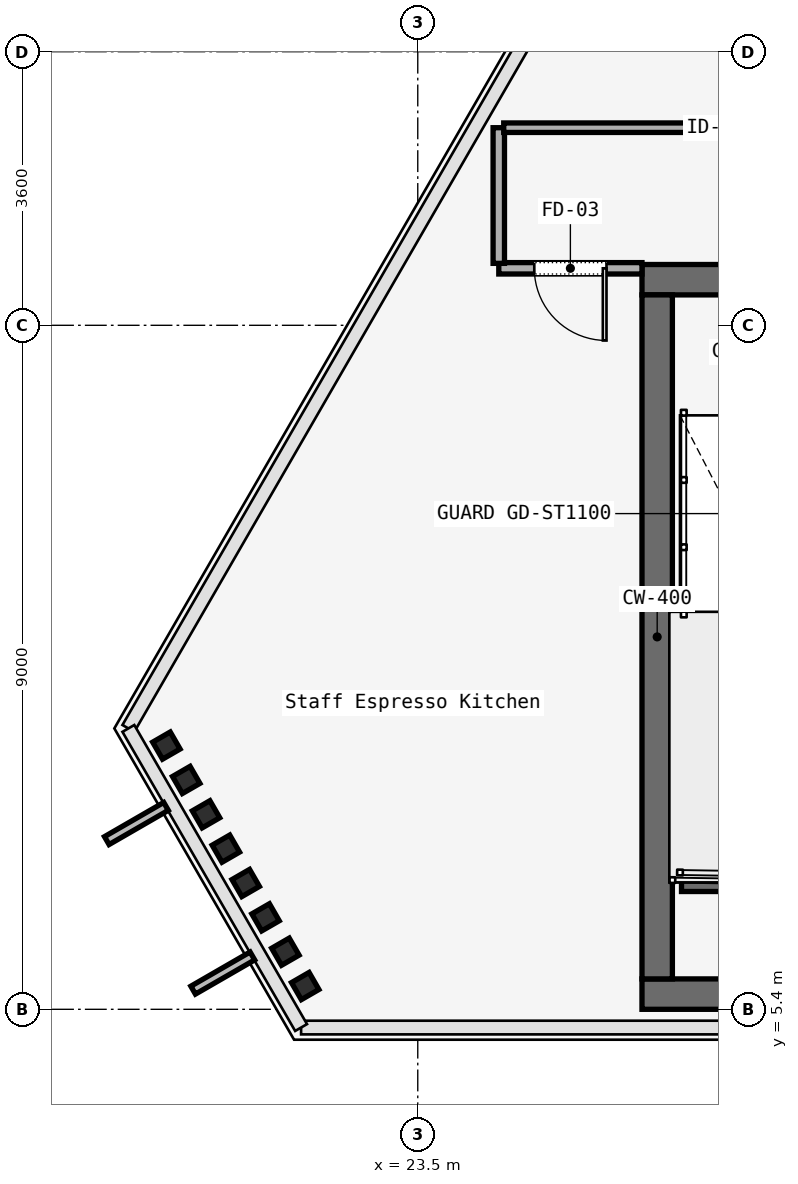
"""IFC4 building model, lengths in metres.
Left out: names, types, materials, properties, quantities, classifications, styles, units other than length and angle.
Written with IfcOpenShell. Run it as: python <this file> out.ifc"""

import sys

from ifc_helpers import new_model, si_unit, direction, frame, frame_2d, origin, origin_2d, place, context, subcontext, project, spatial, rectangle, i_section, extrude, element, fill, save


model = new_model("IFC4")
c1 = context("Model", 3, precision=1e-05, world=origin(), true_north=direction((0.0, 1.0)))
c2 = subcontext(c1, "Body", "Model", "MODEL_VIEW")
j1 = project(units=[si_unit("LENGTHUNIT", "METRE"), si_unit("PLANEANGLEUNIT", "RADIAN")], contexts=[c1])
p1 = place(None, origin())
s1 = spatial("IfcSite", under=j1, at=p1, CompositionType="ELEMENT")
p2 = place(p1, origin())
s2 = spatial("IfcBuilding", under=s1, at=p2, CompositionType="ELEMENT")
p3 = place(p2, frame((0.0, 0.0, 283.3)))
s3 = spatial("IfcBuildingStorey", under=s2, at=p3, CompositionType="ELEMENT", Elevation=283.3)
p4 = place(p3, frame((26.45, 15.0, 0.0), z_axis=(0.0, 0.0, 1.0), x_axis=(1.0, 0.0, 0.0)))
e1 = element("IfcWall", 1, at=p4, inside=s3, PredefinedType="SOLIDWALL", context=c2, shape_type="SweptSolid", body=[
    extrude(rectangle(XDim=31.1, YDim=0.4, at=frame_2d((15.55, 0.0))), origin(), (0.0, 0.0, 1.0), 3.58),
])
p5 = place(p4, frame((1.65, 0.0, 0.0)))
e2 = element("IfcOpeningElement", 2, at=p5, cuts=e1, PredefinedType="OPENING", context=c2, shape_type="SweptSolid", body=[
    extrude(rectangle(XDim=1.1, YDim=2.2, at=frame_2d((0.55, 1.1))), frame((0.0, 0.2, 0.0), z_axis=(0.0, -1.0, 0.0), x_axis=(1.0, 0.0, 0.0)), (0.0, 0.0, 1.0), 0.4),
])
p6 = place(p4, frame((13.65, 0.0, 0.0)))
e3 = element("IfcOpeningElement", 3, at=p6, cuts=e1, PredefinedType="OPENING", context=c2, shape_type="SweptSolid", body=[
    extrude(rectangle(XDim=1.1, YDim=2.2, at=frame_2d((0.55, 1.1))), frame((0.0, 0.2, 0.0), z_axis=(0.0, -1.0, 0.0), x_axis=(1.0, 0.0, 0.0)), (0.0, 0.0, 1.0), 0.4),
])
p7 = place(p4, frame((25.55, 0.0, 0.0)))
e4 = element("IfcOpeningElement", 4, at=p7, cuts=e1, PredefinedType="OPENING", context=c2, shape_type="SweptSolid", body=[
    extrude(rectangle(XDim=1.1, YDim=2.2, at=frame_2d((0.55, 1.1))), frame((0.0, 0.2, 0.0), z_axis=(0.0, -1.0, 0.0), x_axis=(1.0, 0.0, 0.0)), (0.0, 0.0, 1.0), 0.4),
])
p8 = place(p4, frame((19.35, 0.0, 0.0)))
e5 = element("IfcOpeningElement", 5, at=p8, cuts=e1, PredefinedType="OPENING", context=c2, shape_type="SweptSolid", body=[
    extrude(rectangle(XDim=1.1, YDim=2.2, at=frame_2d((0.55, 1.1))), frame((0.0, 0.2, 0.0), z_axis=(0.0, -1.0, 0.0), x_axis=(1.0, 0.0, 0.0)), (0.0, 0.0, 1.0), 0.4),
])
p9 = place(p4, frame((21.4, 0.0, 0.0)))
e6 = element("IfcOpeningElement", 6, at=p9, cuts=e1, PredefinedType="OPENING", context=c2, shape_type="SweptSolid", body=[
    extrude(rectangle(XDim=0.9, YDim=2.1, at=frame_2d((0.45, 1.05))), frame((0.0, 0.2, 0.0), z_axis=(0.0, -1.0, 0.0), x_axis=(1.0, 0.0, 0.0)), (0.0, 0.0, 1.0), 0.4),
])
p10 = place(p4, frame((6.54, 0.0, 0.0)))
e7 = element("IfcOpeningElement", 7, at=p10, cuts=e1, PredefinedType="OPENING", context=c2, shape_type="SweptSolid", body=[
    extrude(rectangle(XDim=0.95, YDim=2.2, at=frame_2d((0.475, 1.1))), frame((0.0, 0.2, 0.0), z_axis=(0.0, -1.0, 0.0), x_axis=(1.0, 0.0, 0.0)), (0.0, 0.0, 1.0), 0.4),
])
p11 = place(p4, frame((10.49, 0.0, 0.0)))
e8 = element("IfcOpeningElement", 8, at=p11, cuts=e1, PredefinedType="OPENING", context=c2, shape_type="SweptSolid", body=[
    extrude(rectangle(XDim=0.95, YDim=2.2, at=frame_2d((0.475, 1.1))), frame((0.0, 0.2, 0.0), z_axis=(0.0, -1.0, 0.0), x_axis=(1.0, 0.0, 0.0)), (0.0, 0.0, 1.0), 0.4),
])
p12 = place(p4, frame((23.35, 0.0, 0.0)))
e9 = element("IfcOpeningElement", 9, at=p12, cuts=e1, PredefinedType="OPENING", context=c2, shape_type="SweptSolid", body=[
    extrude(rectangle(XDim=1.3, YDim=2.3, at=frame_2d((0.65, 1.15))), frame((0.0, 0.2, 0.0), z_axis=(0.0, -1.0, 0.0), x_axis=(1.0, 0.0, 0.0)), (0.0, 0.0, 1.0), 0.4),
])
p13 = place(p3, frame((26.45, 5.6, 0.0), z_axis=(0.0, 0.0, 1.0), x_axis=(1.0, 0.0, 0.0)))
e10 = element("IfcWall", 10, at=p13, inside=s3, PredefinedType="SOLIDWALL", context=c2, shape_type="SweptSolid", body=[
    extrude(rectangle(XDim=31.1, YDim=0.4, at=frame_2d((15.55, 0.0))), origin(), (0.0, 0.0, 1.0), 3.58),
])
p14 = place(p3, frame((26.65, 5.8, 0.0), z_axis=(0.0, 0.0, 1.0), x_axis=(0.0, 1.0, 0.0)))
e11 = element("IfcWall", 11, at=p14, inside=s3, PredefinedType="SOLIDWALL", context=c2, shape_type="SweptSolid", body=[
    extrude(rectangle(XDim=9.0, YDim=0.4, at=frame_2d((4.5, 0.0))), origin(), (0.0, 0.0, 1.0), 3.58),
])
for number, where, z_axis, x_axis in (
    (12, (20.193, 8.87, 0.0), (0.0, 0.0, 1.0), (-0.5, 0.866, 0.0)),
    (13, (20.454, 8.418, 0.0), (0.0, 0.0, 1.0), (-0.5, 0.866, 0.0)),
    (14, (20.714, 7.966, 0.0), (0.0, 0.0, 1.0), (-0.5, 0.866, 0.0)),
    (15, (20.975, 7.514, 0.0), (0.0, 0.0, 1.0), (-0.5, 0.866, 0.0)),
    (16, (21.236, 7.062, 0.0), (0.0, 0.0, 1.0), (-0.5, 0.866, 0.0)),
    (17, (21.497, 6.61, 0.0), (0.0, 0.0, 1.0), (-0.5, 0.866, 0.0)),
    (18, (21.758, 6.158, 0.0), (0.0, 0.0, 1.0), (-0.5, 0.866, 0.0)),
    (19, (22.019, 5.706, 0.0), (0.0, 0.0, 1.0), (-0.5, 0.866, 0.0)),
):
    element("IfcColumn", number, at=place(p3, frame(where, z_axis=z_axis, x_axis=x_axis)), inside=s3, PredefinedType="COLUMN", context=c2, shape_type="SweptSolid", body=[
        extrude(i_section(OverallWidth=0.259, OverallDepth=0.267, WebThickness=0.013, FlangeThickness=0.021, FilletRadius=0.013, at=origin_2d()), origin(), (0.0, 0.0, 1.0), 3.58),
    ])
p15 = place(p3, frame((26.97, 7.05, 0.0), z_axis=(0.0, 0.0, 1.0), x_axis=(1.0, 0.0, 0.0)))
e20 = element("IfcWall", 20, at=p15, inside=s3, PredefinedType="SOLIDWALL", context=c2, shape_type="SweptSolid", body=[
    extrude(rectangle(XDim=3.115, YDim=0.2, at=frame_2d((1.558, 0.0))), origin(), (0.0, 0.0, 1.0), 3.8),
])
p16 = place(p3, frame((26.45, 15.15, 0.0), z_axis=(0.0, 0.0, 1.0), x_axis=(-1.0, 0.0, 0.0)))
e21 = element("IfcWall", 21, at=p16, inside=s3, PredefinedType="PARTITIONING", context=c2, shape_type="SweptSolid", body=[
    extrude(rectangle(XDim=1.884, YDim=0.15, at=frame_2d((0.942, 0.0))), origin(), (0.0, 0.0, 1.0), 3.01),
])
p17 = place(p16, frame((0.467, 0.0, 0.0)))
e22 = element("IfcOpeningElement", 22, at=p17, cuts=e21, PredefinedType="OPENING", context=c2, shape_type="SweptSolid", body=[
    extrude(rectangle(XDim=0.95, YDim=2.2, at=frame_2d((0.475, 1.1))), frame((0.0, 0.075, 0.0), z_axis=(0.0, -1.0, 0.0), x_axis=(1.0, 0.0, 0.0)), (0.0, 0.0, 1.0), 0.15),
])
p18 = place(p3, frame((24.566, 15.215, 0.0), z_axis=(0.0, 0.0, 1.0), x_axis=(0.0, 1.0, 0.0)))
e23 = element("IfcWall", 23, at=p18, inside=s3, PredefinedType="PARTITIONING", context=c2, shape_type="SweptSolid", body=[
    extrude(rectangle(XDim=1.785, YDim=0.15, at=frame_2d((0.893, 0.0))), origin(), (0.0, 0.0, 1.0), 3.01),
])
p19 = place(p3, frame((24.631, 17.0, 0.0), z_axis=(0.0, 0.0, 1.0), x_axis=(1.0, 0.0, 0.0)))
e24 = element("IfcWall", 24, at=p19, inside=s3, PredefinedType="PARTITIONING", context=c2, shape_type="SweptSolid", body=[
    extrude(rectangle(XDim=9.169, YDim=0.125, at=frame_2d((4.584, 0.0))), origin(), (0.0, 0.0, 1.0), 3.01),
])
p20 = place(p19, frame((3.885, 0.0, 0.0)))
e25 = element("IfcOpeningElement", 25, at=p20, cuts=e24, PredefinedType="OPENING", context=c2, shape_type="SweptSolid", body=[
    extrude(rectangle(XDim=1.4, YDim=2.2, at=frame_2d((0.7, 1.1))), frame((0.0, 0.062, 0.0), z_axis=(0.0, -1.0, 0.0), x_axis=(1.0, 0.0, 0.0)), (0.0, 0.0, 1.0), 0.125),
])
p21 = place(p17, origin())
e26 = element("IfcDoor", 26, at=p21, inside=s3, OperationType="SINGLE_SWING_RIGHT", PredefinedType="DOOR", context=c2, shape_type="SweptSolid", body=[
    extrude(rectangle(XDim=0.95, YDim=2.2, at=frame_2d((0.475, 1.1))), frame((0.0, 0.025, 0.0), z_axis=(0.0, -1.0, 0.0), x_axis=(1.0, 0.0, 0.0)), (0.0, 0.0, 1.0), 0.05),
])
fill(e22, e26)
save(model, sys.argv[1])
